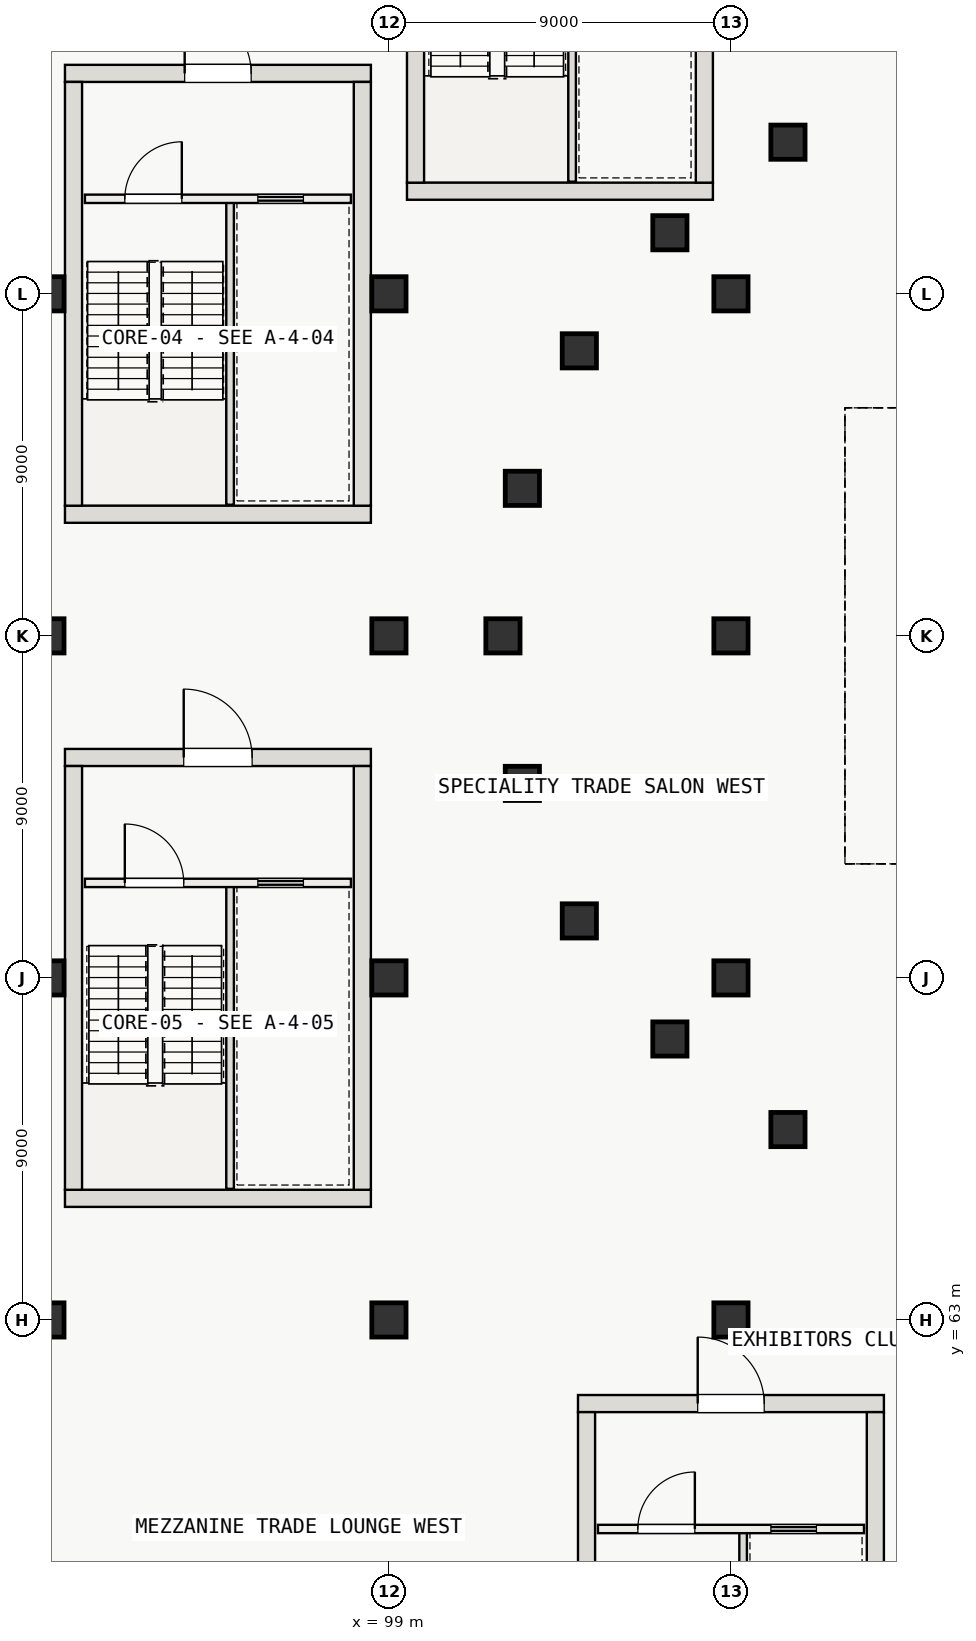
"""IFC4 building model, lengths in metres.
Left out: names, types, materials, properties, quantities, classifications, styles, units other than length and angle.
Written with IfcOpenShell. Run it as: python <this file> out.ifc"""

import sys

from ifc_helpers import new_model, si_unit, direction, frame, frame_2d, origin, origin_2d, place, context, subcontext, project, spatial, rectangle, circle, extrude, element, fill, save


model = new_model("IFC4")
c1 = context("Model", 3, precision=1e-05, world=origin(), true_north=direction((0.0, 1.0)))
c2 = subcontext(c1, "Body", "Model", "MODEL_VIEW")
j1 = project(units=[si_unit("LENGTHUNIT", "METRE"), si_unit("PLANEANGLEUNIT", "RADIAN")], contexts=[c1])
p1 = place(None, origin())
s1 = spatial("IfcSite", under=j1, at=p1, CompositionType="ELEMENT")
p2 = place(p1, origin())
s2 = spatial("IfcBuilding", under=s1, at=p2, CompositionType="ELEMENT")
p3 = place(p2, frame((0.0, 0.0, 12.0)))
s3 = spatial("IfcBuildingStorey", under=s2, at=p3, CompositionType="ELEMENT", Elevation=12.0)
p4 = place(p3, frame((99.475, 92.7, 0.0), z_axis=(0.0, 0.0, 1.0), x_axis=(1.0, 0.0, 0.0)))
e1 = element("IfcWall", 1, at=p4, inside=s3, PredefinedType="SHEAR", context=c2, shape_type="SweptSolid", body=[
    extrude(rectangle(XDim=8.05, YDim=0.45, at=frame_2d((4.025, 0.0))), origin(), (0.0, 0.0, 1.0), 4.8),
])
for number, where, z_axis, x_axis in (
    (2, (99.7, 92.925, 0.0), (0.0, 0.0, 1.0), (0.0, 1.0, 0.0)),
    (3, (107.3, 92.925, 0.0), (0.0, 0.0, 1.0), (0.0, 1.0, 0.0)),
):
    element("IfcWall", number, at=place(p3, frame(where, z_axis=z_axis, x_axis=x_axis)), inside=s3, PredefinedType="SHEAR", context=c2, shape_type="SweptSolid", body=[
        extrude(rectangle(XDim=11.15, YDim=0.45, at=frame_2d((5.575, 0.0))), origin(), (0.0, 0.0, 1.0), 4.8),
    ])
p5 = place(p3, frame((90.475, 84.2, 0.0), z_axis=(0.0, 0.0, 1.0), x_axis=(1.0, 0.0, 0.0)))
e4 = element("IfcWall", 4, at=p5, inside=s3, PredefinedType="SHEAR", context=c2, shape_type="SweptSolid", body=[
    extrude(rectangle(XDim=8.05, YDim=0.45, at=frame_2d((4.025, 0.0))), origin(), (0.0, 0.0, 1.0), 4.8),
])
p6 = place(p3, frame((90.475, 95.8, 0.0), z_axis=(0.0, 0.0, 1.0), x_axis=(1.0, 0.0, 0.0)))
e5 = element("IfcWall", 5, at=p6, inside=s3, PredefinedType="SHEAR", context=c2, shape_type="SweptSolid", body=[
    extrude(rectangle(XDim=8.05, YDim=0.45, at=frame_2d((4.025, 0.0))), origin(), (0.0, 0.0, 1.0), 4.8),
])
p7 = place(p6, frame((3.15, 0.0, 0.0)))
e6 = element("IfcOpeningElement", 6, at=p7, cuts=e5, PredefinedType="OPENING", context=c2, shape_type="SweptSolid", body=[
    extrude(rectangle(XDim=1.75, YDim=2.3, at=frame_2d((0.875, 1.15))), frame((0.0, 0.235, 0.0), z_axis=(0.0, -1.0, 0.0), x_axis=(1.0, 0.0, 0.0)), (0.0, 0.0, 1.0), 0.47),
])
for number, where, z_axis, x_axis in (
    (7, (90.7, 84.425, 0.0), (0.0, 0.0, 1.0), (0.0, 1.0, 0.0)),
    (8, (98.3, 84.425, 0.0), (0.0, 0.0, 1.0), (0.0, 1.0, 0.0)),
):
    element("IfcWall", number, at=place(p3, frame(where, z_axis=z_axis, x_axis=x_axis)), inside=s3, PredefinedType="SHEAR", context=c2, shape_type="SweptSolid", body=[
        extrude(rectangle(XDim=11.15, YDim=0.45, at=frame_2d((5.575, 0.0))), origin(), (0.0, 0.0, 1.0), 4.8),
    ])
p8 = place(p3, frame((90.475, 66.2, 0.0), z_axis=(0.0, 0.0, 1.0), x_axis=(1.0, 0.0, 0.0)))
e9 = element("IfcWall", 9, at=p8, inside=s3, PredefinedType="SHEAR", context=c2, shape_type="SweptSolid", body=[
    extrude(rectangle(XDim=8.05, YDim=0.45, at=frame_2d((4.025, 0.0))), origin(), (0.0, 0.0, 1.0), 4.8),
])
p9 = place(p3, frame((90.475, 77.8, 0.0), z_axis=(0.0, 0.0, 1.0), x_axis=(1.0, 0.0, 0.0)))
e10 = element("IfcWall", 10, at=p9, inside=s3, PredefinedType="SHEAR", context=c2, shape_type="SweptSolid", body=[
    extrude(rectangle(XDim=8.05, YDim=0.45, at=frame_2d((4.025, 0.0))), origin(), (0.0, 0.0, 1.0), 4.8),
])
p10 = place(p9, frame((3.125, 0.0, 0.0)))
e11 = element("IfcOpeningElement", 11, at=p10, cuts=e10, PredefinedType="OPENING", context=c2, shape_type="SweptSolid", body=[
    extrude(rectangle(XDim=1.8, YDim=2.3, at=frame_2d((0.9, 1.15))), frame((0.0, 0.235, 0.0), z_axis=(0.0, -1.0, 0.0), x_axis=(1.0, 0.0, 0.0)), (0.0, 0.0, 1.0), 0.47),
])
for number, where, z_axis, x_axis in (
    (12, (90.7, 66.425, 0.0), (0.0, 0.0, 1.0), (0.0, 1.0, 0.0)),
    (13, (98.3, 66.425, 0.0), (0.0, 0.0, 1.0), (0.0, 1.0, 0.0)),
):
    element("IfcWall", number, at=place(p3, frame(where, z_axis=z_axis, x_axis=x_axis)), inside=s3, PredefinedType="SHEAR", context=c2, shape_type="SweptSolid", body=[
        extrude(rectangle(XDim=11.15, YDim=0.45, at=frame_2d((5.575, 0.0))), origin(), (0.0, 0.0, 1.0), 4.8),
    ])
p11 = place(p3, frame((103.975, 60.8, 0.0), z_axis=(0.0, 0.0, 1.0), x_axis=(1.0, 0.0, 0.0)))
e14 = element("IfcWall", 14, at=p11, inside=s3, PredefinedType="SHEAR", context=c2, shape_type="SweptSolid", body=[
    extrude(rectangle(XDim=8.05, YDim=0.45, at=frame_2d((4.025, 0.0))), origin(), (0.0, 0.0, 1.0), 4.8),
])
p12 = place(p11, frame((3.15, 0.0, 0.0)))
e15 = element("IfcOpeningElement", 15, at=p12, cuts=e14, PredefinedType="OPENING", context=c2, shape_type="SweptSolid", body=[
    extrude(rectangle(XDim=1.75, YDim=2.3, at=frame_2d((0.875, 1.15))), frame((0.0, 0.235, 0.0), z_axis=(0.0, -1.0, 0.0), x_axis=(1.0, 0.0, 0.0)), (0.0, 0.0, 1.0), 0.47),
])
for number, where, z_axis, x_axis in (
    (16, (104.2, 49.425, 0.0), (0.0, 0.0, 1.0), (0.0, 1.0, 0.0)),
    (17, (111.8, 49.425, 0.0), (0.0, 0.0, 1.0), (0.0, 1.0, 0.0)),
):
    element("IfcWall", number, at=place(p3, frame(where, z_axis=z_axis, x_axis=x_axis)), inside=s3, PredefinedType="SHEAR", context=c2, shape_type="SweptSolid", body=[
        extrude(rectangle(XDim=11.15, YDim=0.45, at=frame_2d((5.575, 0.0))), origin(), (0.0, 0.0, 1.0), 4.8),
    ])
for number, where, z_axis, x_axis in (
    (18, (90.0, 63.0, 0.0), (0.0, 0.0, 1.0), (1.0, 0.0, 0.0)),
    (19, (90.0, 72.0, 0.0), (0.0, 0.0, 1.0), (1.0, 0.0, 0.0)),
    (20, (90.0, 81.0, 0.0), (0.0, 0.0, 1.0), (1.0, 0.0, 0.0)),
    (21, (90.0, 90.0, 0.0), (0.0, 0.0, 1.0), (1.0, 0.0, 0.0)),
    (22, (99.0, 63.0, 0.0), (0.0, 0.0, 1.0), (1.0, 0.0, 0.0)),
    (23, (99.0, 72.0, 0.0), (0.0, 0.0, 1.0), (1.0, 0.0, 0.0)),
    (24, (99.0, 81.0, 0.0), (0.0, 0.0, 1.0), (1.0, 0.0, 0.0)),
    (25, (99.0, 90.0, 0.0), (0.0, 0.0, 1.0), (1.0, 0.0, 0.0)),
):
    element("IfcColumn", number, at=place(p3, frame(where, z_axis=z_axis, x_axis=x_axis)), inside=s3, PredefinedType="COLUMN", context=c2, shape_type="SweptSolid", body=[
        extrude(rectangle(XDim=0.9, YDim=0.9, at=origin_2d()), origin(), (0.0, 0.0, 1.0), 4.8),
    ])
for number, where, z_axis, x_axis in (
    (26, (102.0, 81.0, 0.0), (0.0, 0.0, 1.0), (1.0, 0.0, 0.0)),
    (27, (102.511, 77.118, 0.0), (0.0, 0.0, 1.0), (1.0, 0.0, 0.0)),
    (28, (102.511, 84.882, 0.0), (0.0, 0.0, 1.0), (1.0, 0.0, 0.0)),
    (29, (104.01, 73.5, 0.0), (0.0, 0.0, 1.0), (1.0, 0.0, 0.0)),
    (30, (104.01, 88.5, 0.0), (0.0, 0.0, 1.0), (1.0, 0.0, 0.0)),
    (31, (106.393, 70.393, 0.0), (0.0, 0.0, 1.0), (1.0, 0.0, 0.0)),
    (32, (106.393, 91.607, 0.0), (0.0, 0.0, 1.0), (1.0, 0.0, 0.0)),
):
    element("IfcColumn", number, at=place(p3, frame(where, z_axis=z_axis, x_axis=x_axis)), inside=s3, PredefinedType="COLUMN", context=c2, shape_type="SweptSolid", body=[
        extrude(circle(Radius=0.45, at=origin_2d()), origin(), (0.0, 0.0, 1.0), 4.8),
    ])
for number, where, z_axis, x_axis in (
    (33, (108.0, 63.0, 0.0), (0.0, 0.0, 1.0), (1.0, 0.0, 0.0)),
    (34, (108.0, 72.0, 0.0), (0.0, 0.0, 1.0), (1.0, 0.0, 0.0)),
    (35, (108.0, 81.0, 0.0), (0.0, 0.0, 1.0), (1.0, 0.0, 0.0)),
    (36, (108.0, 90.0, 0.0), (0.0, 0.0, 1.0), (1.0, 0.0, 0.0)),
):
    element("IfcColumn", number, at=place(p3, frame(where, z_axis=z_axis, x_axis=x_axis)), inside=s3, PredefinedType="COLUMN", context=c2, shape_type="SweptSolid", body=[
        extrude(rectangle(XDim=0.9, YDim=0.9, at=origin_2d()), origin(), (0.0, 0.0, 1.0), 4.8),
    ])
for number, where, z_axis, x_axis in (
    (37, (109.5, 68.01, 0.0), (0.0, 0.0, 1.0), (1.0, 0.0, 0.0)),
    (38, (109.5, 93.99, 0.0), (0.0, 0.0, 1.0), (1.0, 0.0, 0.0)),
):
    element("IfcColumn", number, at=place(p3, frame(where, z_axis=z_axis, x_axis=x_axis)), inside=s3, PredefinedType="COLUMN", context=c2, shape_type="SweptSolid", body=[
        extrude(circle(Radius=0.45, at=origin_2d()), origin(), (0.0, 0.0, 1.0), 4.8),
    ])
for number, where, z_axis, x_axis in (
    (39, (103.82, 92.95, 0.0), (0.0, 0.0, 1.0), (0.0, 1.0, 0.0)),
    (40, (94.82, 84.45, 0.0), (0.0, 0.0, 1.0), (0.0, 1.0, 0.0)),
):
    element("IfcWall", number, at=place(p3, frame(where, z_axis=z_axis, x_axis=x_axis)), inside=s3, PredefinedType="SOLIDWALL", context=c2, shape_type="SweptSolid", body=[
        extrude(rectangle(XDim=8.0, YDim=0.2, at=frame_2d((4.0, 0.0))), origin(), (0.0, 0.0, 1.0), 4.8),
    ])
p13 = place(p3, frame((91.0, 92.5, 0.0), z_axis=(0.0, 0.0, 1.0), x_axis=(1.0, 0.0, 0.0)))
e41 = element("IfcWall", 41, at=p13, inside=s3, PredefinedType="SOLIDWALL", context=c2, shape_type="SweptSolid", body=[
    extrude(rectangle(XDim=7.0, YDim=0.22, at=frame_2d((3.5, 0.0))), origin(), (0.0, 0.0, 1.0), 4.5),
])
p14 = place(p13, frame((1.05, 0.0, 0.0)))
e42 = element("IfcOpeningElement", 42, at=p14, cuts=e41, PredefinedType="OPENING", context=c2, shape_type="SweptSolid", body=[
    extrude(rectangle(XDim=1.5, YDim=2.2, at=frame_2d((0.75, 1.1))), frame((0.0, 0.12, 0.0), z_axis=(0.0, -1.0, 0.0), x_axis=(1.0, 0.0, 0.0)), (0.0, 0.0, 1.0), 0.24),
])
p15 = place(p13, frame((4.55, 0.0, 0.0)))
e43 = element("IfcOpeningElement", 43, at=p15, cuts=e41, PredefinedType="OPENING", context=c2, shape_type="SweptSolid", body=[
    extrude(rectangle(XDim=1.2, YDim=2.2, at=frame_2d((0.6, 1.1))), frame((0.0, 0.12, 0.0), z_axis=(0.0, -1.0, 0.0), x_axis=(1.0, 0.0, 0.0)), (0.0, 0.0, 1.0), 0.24),
])
p16 = place(p3, frame((94.82, 66.45, 0.0), z_axis=(0.0, 0.0, 1.0), x_axis=(0.0, 1.0, 0.0)))
e44 = element("IfcWall", 44, at=p16, inside=s3, PredefinedType="SOLIDWALL", context=c2, shape_type="SweptSolid", body=[
    extrude(rectangle(XDim=8.0, YDim=0.2, at=frame_2d((4.0, 0.0))), origin(), (0.0, 0.0, 1.0), 4.8),
])
p17 = place(p3, frame((91.0, 74.5, 0.0), z_axis=(0.0, 0.0, 1.0), x_axis=(1.0, 0.0, 0.0)))
e45 = element("IfcWall", 45, at=p17, inside=s3, PredefinedType="SOLIDWALL", context=c2, shape_type="SweptSolid", body=[
    extrude(rectangle(XDim=7.0, YDim=0.22, at=frame_2d((3.5, 0.0))), origin(), (0.0, 0.0, 1.0), 4.5),
])
p18 = place(p17, frame((1.05, 0.0, 0.0)))
e46 = element("IfcOpeningElement", 46, at=p18, cuts=e45, PredefinedType="OPENING", context=c2, shape_type="SweptSolid", body=[
    extrude(rectangle(XDim=1.55, YDim=2.2, at=frame_2d((0.775, 1.1))), frame((0.0, 0.12, 0.0), z_axis=(0.0, -1.0, 0.0), x_axis=(1.0, 0.0, 0.0)), (0.0, 0.0, 1.0), 0.24),
])
p19 = place(p17, frame((4.55, 0.0, 0.0)))
e47 = element("IfcOpeningElement", 47, at=p19, cuts=e45, PredefinedType="OPENING", context=c2, shape_type="SweptSolid", body=[
    extrude(rectangle(XDim=1.2, YDim=2.2, at=frame_2d((0.6, 1.1))), frame((0.0, 0.12, 0.0), z_axis=(0.0, -1.0, 0.0), x_axis=(1.0, 0.0, 0.0)), (0.0, 0.0, 1.0), 0.24),
])
p20 = place(p3, frame((108.32, 49.45, 0.0), z_axis=(0.0, 0.0, 1.0), x_axis=(0.0, 1.0, 0.0)))
e48 = element("IfcWall", 48, at=p20, inside=s3, PredefinedType="SOLIDWALL", context=c2, shape_type="SweptSolid", body=[
    extrude(rectangle(XDim=8.0, YDim=0.2, at=frame_2d((4.0, 0.0))), origin(), (0.0, 0.0, 1.0), 4.8),
])
p21 = place(p3, frame((104.5, 57.5, 0.0), z_axis=(0.0, 0.0, 1.0), x_axis=(1.0, 0.0, 0.0)))
e49 = element("IfcWall", 49, at=p21, inside=s3, PredefinedType="SOLIDWALL", context=c2, shape_type="SweptSolid", body=[
    extrude(rectangle(XDim=7.0, YDim=0.22, at=frame_2d((3.5, 0.0))), origin(), (0.0, 0.0, 1.0), 4.5),
])
p22 = place(p21, frame((1.05, 0.0, 0.0)))
e50 = element("IfcOpeningElement", 50, at=p22, cuts=e49, PredefinedType="OPENING", context=c2, shape_type="SweptSolid", body=[
    extrude(rectangle(XDim=1.5, YDim=2.2, at=frame_2d((0.75, 1.1))), frame((0.0, 0.12, 0.0), z_axis=(0.0, -1.0, 0.0), x_axis=(1.0, 0.0, 0.0)), (0.0, 0.0, 1.0), 0.24),
])
p23 = place(p21, frame((4.55, 0.0, 0.0)))
e51 = element("IfcOpeningElement", 51, at=p23, cuts=e49, PredefinedType="OPENING", context=c2, shape_type="SweptSolid", body=[
    extrude(rectangle(XDim=1.2, YDim=2.2, at=frame_2d((0.6, 1.1))), frame((0.0, 0.12, 0.0), z_axis=(0.0, -1.0, 0.0), x_axis=(1.0, 0.0, 0.0)), (0.0, 0.0, 1.0), 0.24),
])
p24 = place(p14, origin())
e52 = element("IfcDoor", 52, at=p24, inside=s3, OperationType="SINGLE_SWING_RIGHT", PredefinedType="DOOR", context=c2, shape_type="SweptSolid", body=[
    extrude(rectangle(XDim=1.5, YDim=2.2, at=frame_2d((0.75, 1.1))), frame((0.0, 0.025, 0.0), z_axis=(0.0, -1.0, 0.0), x_axis=(1.0, 0.0, 0.0)), (0.0, 0.0, 1.0), 0.05),
])
fill(e42, e52)
p25 = place(p15, origin())
e53 = element("IfcDoor", 53, at=p25, inside=s3, OperationType="SLIDING_TO_RIGHT", PredefinedType="DOOR", context=c2, shape_type="SweptSolid", body=[
    extrude(rectangle(XDim=1.2, YDim=2.2, at=frame_2d((0.6, 1.1))), frame((0.0, 0.025, 0.0), z_axis=(0.0, -1.0, 0.0), x_axis=(1.0, 0.0, 0.0)), (0.0, 0.0, 1.0), 0.05),
])
fill(e43, e53)
p26 = place(p7, origin())
e54 = element("IfcDoor", 54, at=p26, inside=s3, OperationType="DOUBLE_DOOR_SINGLE_SWING", PredefinedType="DOOR", context=c2, shape_type="SweptSolid", body=[
    extrude(rectangle(XDim=1.75, YDim=2.3, at=frame_2d((0.875, 1.15))), frame((0.0, 0.025, 0.0), z_axis=(0.0, -1.0, 0.0), x_axis=(1.0, 0.0, 0.0)), (0.0, 0.0, 1.0), 0.05),
])
fill(e6, e54)
p27 = place(p18, origin())
e55 = element("IfcDoor", 55, at=p27, inside=s3, OperationType="SINGLE_SWING_LEFT", PredefinedType="DOOR", context=c2, shape_type="SweptSolid", body=[
    extrude(rectangle(XDim=1.55, YDim=2.2, at=frame_2d((0.775, 1.1))), frame((0.0, 0.025, 0.0), z_axis=(0.0, -1.0, 0.0), x_axis=(1.0, 0.0, 0.0)), (0.0, 0.0, 1.0), 0.05),
])
fill(e46, e55)
p28 = place(p19, origin())
e56 = element("IfcDoor", 56, at=p28, inside=s3, OperationType="SLIDING_TO_LEFT", PredefinedType="DOOR", context=c2, shape_type="SweptSolid", body=[
    extrude(rectangle(XDim=1.2, YDim=2.2, at=frame_2d((0.6, 1.1))), frame((0.0, 0.025, 0.0), z_axis=(0.0, -1.0, 0.0), x_axis=(1.0, 0.0, 0.0)), (0.0, 0.0, 1.0), 0.05),
])
fill(e47, e56)
p29 = place(p10, origin())
e57 = element("IfcDoor", 57, at=p29, inside=s3, OperationType="DOUBLE_DOOR_SINGLE_SWING", PredefinedType="DOOR", context=c2, shape_type="SweptSolid", body=[
    extrude(rectangle(XDim=1.8, YDim=2.3, at=frame_2d((0.9, 1.15))), frame((0.0, 0.025, 0.0), z_axis=(0.0, -1.0, 0.0), x_axis=(1.0, 0.0, 0.0)), (0.0, 0.0, 1.0), 0.05),
])
fill(e11, e57)
p30 = place(p22, origin())
e58 = element("IfcDoor", 58, at=p30, inside=s3, OperationType="SINGLE_SWING_RIGHT", PredefinedType="DOOR", context=c2, shape_type="SweptSolid", body=[
    extrude(rectangle(XDim=1.5, YDim=2.2, at=frame_2d((0.75, 1.1))), frame((0.0, 0.025, 0.0), z_axis=(0.0, -1.0, 0.0), x_axis=(1.0, 0.0, 0.0)), (0.0, 0.0, 1.0), 0.05),
])
fill(e50, e58)
p31 = place(p23, origin())
e59 = element("IfcDoor", 59, at=p31, inside=s3, OperationType="SLIDING_TO_RIGHT", PredefinedType="DOOR", context=c2, shape_type="SweptSolid", body=[
    extrude(rectangle(XDim=1.2, YDim=2.2, at=frame_2d((0.6, 1.1))), frame((0.0, 0.025, 0.0), z_axis=(0.0, -1.0, 0.0), x_axis=(1.0, 0.0, 0.0)), (0.0, 0.0, 1.0), 0.05),
])
fill(e51, e59)
p32 = place(p12, origin())
e60 = element("IfcDoor", 60, at=p32, inside=s3, OperationType="DOUBLE_DOOR_SINGLE_SWING", PredefinedType="DOOR", context=c2, shape_type="SweptSolid", body=[
    extrude(rectangle(XDim=1.75, YDim=2.3, at=frame_2d((0.875, 1.15))), frame((0.0, 0.025, 0.0), z_axis=(0.0, -1.0, 0.0), x_axis=(1.0, 0.0, 0.0)), (0.0, 0.0, 1.0), 0.05),
])
fill(e15, e60)
save(model, sys.argv[1])
